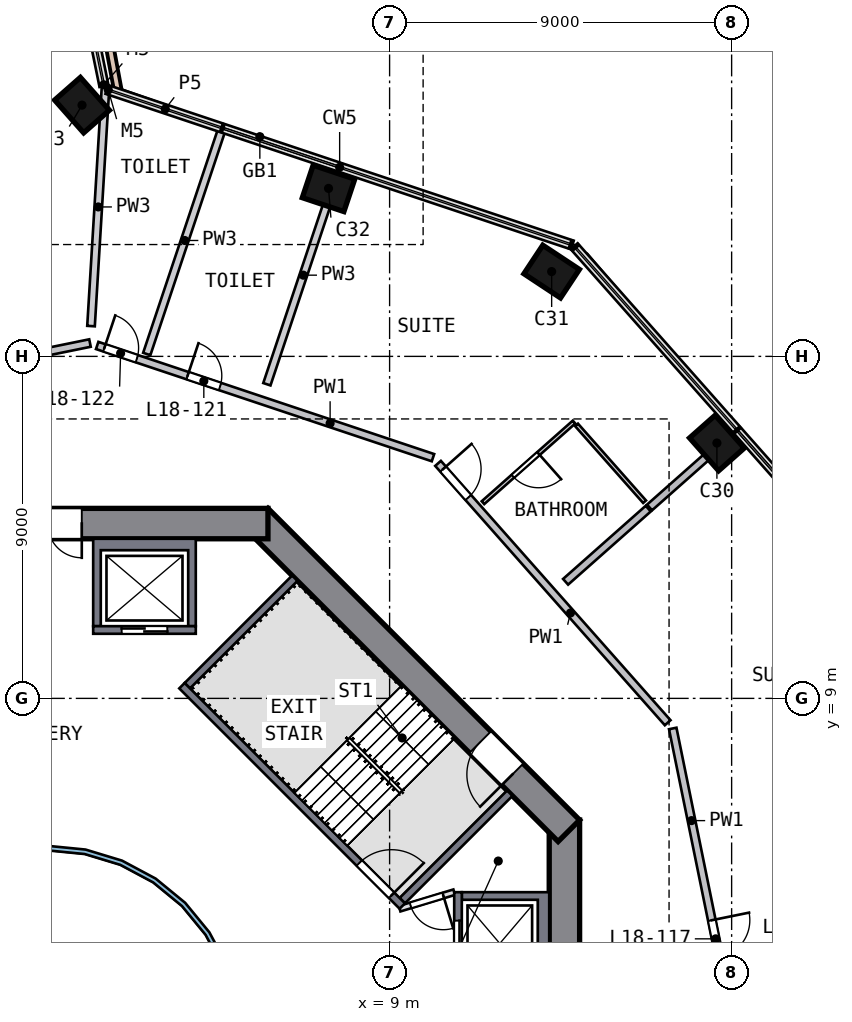
"""IFC4 building model, lengths in metres.
Left out: names, types, materials, properties, quantities, classifications, styles, units other than length and angle.
Written with IfcOpenShell. Run it as: python <this file> out.ifc"""

import sys

from ifc_helpers import new_model, si_unit, direction, frame, frame_2d, origin, origin_2d, place, context, subcontext, project, spatial, polyline, rectangle, outline, extrude, element, fill, save


model = new_model("IFC4")
c1 = context("Model", 3, precision=1e-05, world=origin(), true_north=direction((0.0, 1.0)))
c2 = subcontext(c1, "Body", "Model", "MODEL_VIEW")
j1 = project(units=[si_unit("LENGTHUNIT", "METRE"), si_unit("PLANEANGLEUNIT", "RADIAN")], contexts=[c1])
p1 = place(None, origin())
s1 = spatial("IfcSite", under=j1, at=p1, CompositionType="ELEMENT")
p2 = place(p1, origin())
s2 = spatial("IfcBuilding", under=s1, at=p2, CompositionType="ELEMENT")
p3 = place(p2, frame((0.0, 0.0, 81.0)))
s3 = spatial("IfcBuildingStorey", under=s2, at=p3, CompositionType="ELEMENT", Elevation=81.0)
p4 = place(p3, frame((17.676, 15.649, 0.0), z_axis=(-0.052724417, 0.058640346, 0.996885874), x_axis=(-0.660246291, 0.746898066, -0.078855026)))
e1 = element("IfcColumn", 1, at=p4, inside=s3, PredefinedType="COLUMN", context=c2, shape_type="SweptSolid", body=[
    extrude(rectangle(XDim=1.15, YDim=0.9, at=origin_2d()), origin(), (0.0, 0.0, 1.0), 4.705),
])
p5 = place(p3, frame((13.346, 20.179, 0.0), z_axis=(-0.067763164, 0.043999359, 0.996730761), x_axis=(0.831358719, -0.549832111, 0.080791885)))
e2 = element("IfcColumn", 2, at=p5, inside=s3, PredefinedType="COLUMN", context=c2, shape_type="SweptSolid", body=[
    extrude(rectangle(XDim=1.15, YDim=0.9, at=origin_2d()), origin(), (0.0, 0.0, 1.0), 4.705),
])
p6 = place(p3, frame((7.483, 22.391, 0.0), z_axis=(-0.074987109, 0.024338376, 0.996887444), x_axis=(-0.945566595, 0.31573538, -0.07883517)))
e3 = element("IfcColumn", 3, at=p6, inside=s3, PredefinedType="COLUMN", context=c2, shape_type="SweptSolid", body=[
    extrude(rectangle(XDim=1.15, YDim=0.9, at=origin_2d()), origin(), (0.0, 0.0, 1.0), 4.705),
])
p7 = place(p3, frame((1.006, 24.608, 0.0), z_axis=(-0.082177856, 0.002697758, 0.996614029), x_axis=(0.659030339, -0.750000815, 0.056371895)))
e4 = element("IfcColumn", 4, at=p7, inside=s3, PredefinedType="COLUMN", context=c2, shape_type="SweptSolid", body=[
    extrude(rectangle(XDim=1.15, YDim=0.9, at=origin_2d()), origin(), (0.0, 0.0, 1.0), 4.706),
])
p8 = place(p3, frame((13.6, -5.799, 0.0), z_axis=(0.0, 0.0, 1.0), x_axis=(0.0, 1.0, 0.0)))
e5 = element("IfcWall", 5, at=p8, inside=s3, PredefinedType="SHEAR", context=c2, shape_type="SweptSolid", body=[
    extrude(rectangle(XDim=11.598, YDim=0.8, at=frame_2d((5.799, 0.0))), origin(), (0.0, 0.0, 1.0), 5.0),
])
p9 = place(p8, frame((4.899, 0.0, 0.0)))
e6 = element("IfcOpeningElement", 6, at=p9, cuts=e5, PredefinedType="OPENING", context=c2, shape_type="SweptSolid", body=[
    extrude(rectangle(XDim=1.8, YDim=2.1, at=frame_2d((0.9, 1.05))), frame((0.0, 0.41, 0.0), z_axis=(0.0, -1.0, 0.0), x_axis=(1.0, 0.0, 0.0)), (0.0, 0.0, 1.0), 0.82),
])
p10 = place(p3, frame((13.717, 5.516, 0.0), z_axis=(0.0, 0.0, 1.0), x_axis=(-0.707106781, 0.707106781, 0.0)))
e7 = element("IfcWall", 7, at=p10, inside=s3, PredefinedType="SHEAR", context=c2, shape_type="SweptSolid", body=[
    extrude(rectangle(XDim=11.598, YDim=0.8, at=frame_2d((5.799, 0.0))), origin(), (0.0, 0.0, 1.0), 5.0),
])
p11 = place(p10, frame((2.099, 0.0, 0.0)))
e8 = element("IfcOpeningElement", 8, at=p11, cuts=e7, PredefinedType="OPENING", context=c2, shape_type="SweptSolid", body=[
    extrude(rectangle(XDim=1.2, YDim=2.1, at=frame_2d((0.6, 1.05))), frame((0.0, 0.41, 0.0), z_axis=(0.0, -1.0, 0.0), x_axis=(1.0, 0.0, 0.0)), (0.0, 0.0, 1.0), 0.82),
])
p12 = place(p3, frame((5.799, 13.6, 0.0), z_axis=(0.0, 0.0, 1.0), x_axis=(-1.0, 0.0, 0.0)))
e9 = element("IfcWall", 9, at=p12, inside=s3, PredefinedType="SHEAR", context=c2, shape_type="SweptSolid", body=[
    extrude(rectangle(XDim=11.598, YDim=0.8, at=frame_2d((5.799, 0.0))), origin(), (0.0, 0.0, 1.0), 5.0),
])
p13 = place(p12, frame((4.899, 0.0, 0.0)))
e10 = element("IfcOpeningElement", 10, at=p13, cuts=e9, PredefinedType="OPENING", context=c2, shape_type="SweptSolid", body=[
    extrude(rectangle(XDim=1.8, YDim=2.1, at=frame_2d((0.9, 1.05))), frame((0.0, 0.41, 0.0), z_axis=(0.0, -1.0, 0.0), x_axis=(1.0, 0.0, 0.0)), (0.0, 0.0, 1.0), 0.82),
])
p14 = place(p3, frame((1.855, 24.972, 0.0), z_axis=(0.0, 0.0, 1.0), x_axis=(-0.183261306, 0.983064237, 0.0)))
e11 = element("IfcWall", 11, at=p14, inside=s3, PredefinedType="PARAPET", context=c2, shape_type="SweptSolid", body=[
    extrude(rectangle(XDim=9.845, YDim=0.2, at=frame_2d((4.922, 0.0))), origin(), (0.0, 0.0, 1.0), 1.1),
])
p15 = place(p3, origin())
e12 = element("IfcWall", 12, at=p15, inside=s3, PredefinedType="SOLIDWALL", context=c2, shape_type="SweptSolid", body=[
    extrude(outline(polyline([(13.2, 3.9), (13.2, 1.2), (10.9, 1.2), (10.9, 1.4), (12.9, 1.4), (12.9, 3.7), (10.9, 3.7), (10.9, 3.9), (13.2, 3.9)])), origin(), (0.0, 0.0, 1.0), 4.69),
])
p16 = place(p3, frame((10.8, 1.2, 0.0), z_axis=(0.0, 0.0, 1.0), x_axis=(0.0, 1.0, 0.0)))
e13 = element("IfcWall", 13, at=p16, inside=s3, PredefinedType="SOLIDWALL", context=c2, shape_type="SweptSolid", body=[
    extrude(rectangle(XDim=2.7, YDim=0.2, at=frame_2d((1.35, 0.0))), origin(), (0.0, 0.0, 1.0), 4.69),
])
p17 = place(p16, frame((0.75, 0.0, 0.0)))
e14 = element("IfcOpeningElement", 14, at=p17, cuts=e13, PredefinedType="OPENING", context=c2, shape_type="SweptSolid", body=[
    extrude(rectangle(XDim=1.2, YDim=2.1, at=frame_2d((0.6, 1.05))), frame((0.0, 0.11, 0.0), z_axis=(0.0, -1.0, 0.0), x_axis=(1.0, 0.0, 0.0)), (0.0, 0.0, 1.0), 0.22),
])
p18 = place(p3, origin())
e15 = element("IfcWall", 15, at=p18, inside=s3, PredefinedType="SOLIDWALL", context=c2, shape_type="SweptSolid", body=[
    extrude(outline(polyline([(3.9, 13.2), (3.9, 10.9), (3.7, 10.9), (3.7, 12.9), (1.4, 12.9), (1.4, 10.9), (1.2, 10.9), (1.2, 13.2), (3.9, 13.2)])), origin(), (0.0, 0.0, 1.0), 4.69),
])
p19 = place(p3, frame((1.2, 10.8, 0.0), z_axis=(0.0, 0.0, 1.0), x_axis=(1.0, 0.0, 0.0)))
e16 = element("IfcWall", 16, at=p19, inside=s3, PredefinedType="SOLIDWALL", context=c2, shape_type="SweptSolid", body=[
    extrude(rectangle(XDim=2.7, YDim=0.2, at=frame_2d((1.35, 0.0))), origin(), (0.0, 0.0, 1.0), 4.69),
])
p20 = place(p19, frame((0.75, 0.0, 0.0)))
e17 = element("IfcOpeningElement", 17, at=p20, cuts=e16, PredefinedType="OPENING", context=c2, shape_type="SweptSolid", body=[
    extrude(rectangle(XDim=1.2, YDim=2.1, at=frame_2d((0.6, 1.05))), frame((0.0, 0.11, 0.0), z_axis=(0.0, -1.0, 0.0), x_axis=(1.0, 0.0, 0.0)), (0.0, 0.0, 1.0), 0.22),
])
p21 = place(p3, frame((3.535, 9.334, 0.0), z_axis=(0.0, 0.0, 1.0), x_axis=(0.707106781, -0.707106781, 0.0)))
e18 = element("IfcWall", 18, at=p21, inside=s3, PredefinedType="SOLIDWALL", context=c2, shape_type="SweptSolid", body=[
    extrude(rectangle(XDim=8.2, YDim=0.2, at=frame_2d((4.1, 0.0))), origin(), (0.0, 0.0, 1.0), 4.69),
])
p22 = place(p21, frame((6.6, 0.0, 0.0)))
e19 = element("IfcOpeningElement", 19, at=p22, cuts=e18, PredefinedType="OPENING", context=c2, shape_type="SweptSolid", body=[
    extrude(rectangle(XDim=1.2, YDim=2.1, at=frame_2d((0.6, 1.05))), frame((0.0, 0.11, 0.0), z_axis=(0.0, -1.0, 0.0), x_axis=(1.0, 0.0, 0.0)), (0.0, 0.0, 1.0), 0.22),
])
for number, where, z_axis, x_axis in (
    (20, (9.334, 3.677, 0.0), (0.0, 0.0, 1.0), (0.707, 0.707, 0.0)),
    (21, (3.677, 9.334, 0.0), (0.0, 0.0, 1.0), (0.707, 0.707, 0.0)),
):
    element("IfcWall", number, at=place(p3, frame(where, z_axis=z_axis, x_axis=x_axis)), inside=s3, PredefinedType="SOLIDWALL", context=c2, shape_type="SweptSolid", body=[
        extrude(rectangle(XDim=4.0, YDim=0.2, at=frame_2d((2.0, 0.0))), origin(), (0.0, 0.0, 1.0), 4.69),
    ])
p23 = place(p3, frame((10.7, 3.9, 0.0), z_axis=(0.0, 0.0, 1.0), x_axis=(-0.957084567, -0.289808785, 0.0)))
e22 = element("IfcWall", 22, at=p23, inside=s3, PredefinedType="PARTITIONING", context=c2, shape_type="SweptSolid", body=[
    extrude(rectangle(XDim=1.501, YDim=0.15, at=frame_2d((0.75, 0.0))), origin(), (0.0, 0.0, 1.0), 4.69),
])
p24 = place(p23, frame((0.301, 0.0, 0.0)))
e23 = element("IfcOpeningElement", 23, at=p24, cuts=e22, PredefinedType="OPENING", context=c2, shape_type="SweptSolid", body=[
    extrude(rectangle(XDim=0.9, YDim=2.1, at=frame_2d((0.45, 1.05))), frame((0.0, 0.085, 0.0), z_axis=(0.0, -1.0, 0.0), x_axis=(1.0, 0.0, 0.0)), (0.0, 0.0, 1.0), 0.17),
])
p25 = place(p3, origin())
e24 = element("IfcWall", 24, at=p25, inside=s3, PredefinedType="SOLIDWALL", context=c2, shape_type="SweptSolid", body=[
    extrude(outline(polyline([(5.021, -0.999), (4.73, -1.959), (4.257, -2.844), (3.62, -3.62), (2.844, -4.257), (1.959, -4.73), (0.999, -5.021), (0.0, -5.12), (-0.999, -5.021), (-1.959, -4.73), (-2.844, -4.257), (-3.62, -3.62), (-4.257, -2.844), (-4.73, -1.959), (-5.021, -0.999), (-5.12, 0.0), (-5.021, 0.999), (-4.73, 1.959), (-4.257, 2.844), (-3.62, 3.62), (-2.844, 4.257), (-1.959, 4.73), (-0.999, 5.021), (0.0, 5.12), (0.999, 5.021), (1.959, 4.73), (2.844, 4.257), (3.62, 3.62), (4.257, 2.844), (4.73, 1.959), (5.021, 0.999), (5.12, 0.0), (5.021, -0.999)]), holes=[polyline([(4.904, 0.976), (4.619, 1.913), (4.157, 2.778), (3.535, 3.535), (2.778, 4.157), (1.913, 4.619), (0.976, 4.904), (0.0, 5.0), (-0.976, 4.904), (-1.913, 4.619), (-2.778, 4.157), (-3.535, 3.535), (-4.157, 2.778), (-4.619, 1.913), (-4.904, 0.976), (-5.0, 0.0), (-4.904, -0.976), (-4.619, -1.913), (-4.157, -2.778), (-3.535, -3.535), (-2.778, -4.157), (-1.913, -4.619), (-0.976, -4.904), (0.0, -5.0), (0.976, -4.904), (1.913, -4.619), (2.778, -4.157), (3.535, -3.535), (4.157, -2.778), (4.619, -1.913), (4.904, -0.976), (5.0, 0.0), (4.904, 0.976)])]), origin(), (0.0, 0.0, 1.0), 4.69),
])
p26 = place(p3, frame((1.116, 18.351, 0.0), z_axis=(0.0, 0.0, 1.0), x_axis=(-0.979854553, -0.19971243, 0.0)))
e25 = element("IfcWall", 25, at=p26, inside=s3, PredefinedType="SOLIDWALL", context=c2, shape_type="SweptSolid", body=[
    extrude(rectangle(XDim=3.458, YDim=0.2, at=frame_2d((1.729, 0.0))), origin(), (0.0, 0.0, 1.0), 4.69),
])
p27 = place(p3, frame((1.306, 18.288, 0.0), z_axis=(0.0, 0.0, 1.0), x_axis=(0.948428791, -0.316990264, 0.0)))
e26 = element("IfcWall", 26, at=p27, inside=s3, PredefinedType="SOLIDWALL", context=c2, shape_type="SweptSolid", body=[
    extrude(rectangle(XDim=9.316, YDim=0.2, at=frame_2d((4.658, 0.0))), origin(), (0.0, 0.0, 1.0), 4.69),
])
p28 = place(p27, frame((2.508, 0.0, 0.0)))
e27 = element("IfcOpeningElement", 27, at=p28, cuts=e26, PredefinedType="OPENING", context=c2, shape_type="SweptSolid", body=[
    extrude(rectangle(XDim=0.9, YDim=2.1, at=frame_2d((0.45, 1.05))), frame((0.0, 0.11, 0.0), z_axis=(0.0, -1.0, 0.0), x_axis=(1.0, 0.0, 0.0)), (0.0, 0.0, 1.0), 0.22),
])
p29 = place(p27, frame((0.2, 0.0, 0.0)))
e28 = element("IfcOpeningElement", 28, at=p29, cuts=e26, PredefinedType="OPENING", context=c2, shape_type="SweptSolid", body=[
    extrude(rectangle(XDim=0.9, YDim=2.1, at=frame_2d((0.45, 1.05))), frame((0.0, 0.11, 0.0), z_axis=(0.0, -1.0, 0.0), x_axis=(1.0, 0.0, 0.0)), (0.0, 0.0, 1.0), 0.22),
])
p30 = place(p3, frame((10.275, 15.184, 0.0), z_axis=(0.0, 0.0, 1.0), x_axis=(0.662882999, -0.748722999, 0.0)))
e29 = element("IfcWall", 29, at=p30, inside=s3, PredefinedType="SOLIDWALL", context=c2, shape_type="SweptSolid", body=[
    extrude(rectangle(XDim=9.115, YDim=0.2, at=frame_2d((4.558, 0.0))), origin(), (0.0, 0.0, 1.0), 4.69),
])
p31 = place(p30, frame((0.2, 0.0, 0.0)))
e30 = element("IfcOpeningElement", 30, at=p31, cuts=e29, PredefinedType="OPENING", context=c2, shape_type="SweptSolid", body=[
    extrude(rectangle(XDim=1.0, YDim=2.1, at=frame_2d((0.5, 1.05))), frame((0.0, 0.11, 0.0), z_axis=(0.0, -1.0, 0.0), x_axis=(1.0, 0.0, 0.0)), (0.0, 0.0, 1.0), 0.22),
])
p32 = place(p3, frame((16.45, 8.208, 0.0), z_axis=(0.0, 0.0, 1.0), x_axis=(0.199693015, -0.97985851, 0.0)))
e31 = element("IfcWall", 31, at=p32, inside=s3, PredefinedType="SOLIDWALL", context=c2, shape_type="SweptSolid", body=[
    extrude(rectangle(XDim=9.316, YDim=0.2, at=frame_2d((4.658, 0.0))), origin(), (0.0, 0.0, 1.0), 4.69),
])
p33 = place(p32, frame((5.15, 0.0, 0.0)))
e32 = element("IfcOpeningElement", 32, at=p33, cuts=e31, PredefinedType="OPENING", context=c2, shape_type="SweptSolid", body=[
    extrude(rectangle(XDim=1.0, YDim=2.1, at=frame_2d((0.5, 1.05))), frame((0.0, 0.11, 0.0), z_axis=(0.0, -1.0, 0.0), x_axis=(1.0, 0.0, 0.0)), (0.0, 0.0, 1.0), 0.22),
])
p34 = place(p3, frame((13.631, 12.068, 0.0), z_axis=(0.0, 0.0, 1.0), x_axis=(0.748710935, 0.662896626, 0.0)))
e33 = element("IfcWall", 33, at=p34, inside=s3, PredefinedType="SOLIDWALL", context=c2, shape_type="SweptSolid", body=[
    extrude(rectangle(XDim=2.905, YDim=0.2, at=frame_2d((1.452, 0.0))), origin(), (0.0, 0.0, 1.0), 4.69),
])
p35 = place(p3, frame((15.84, 14.024, 0.0), z_axis=(0.0, 0.0, 1.0), x_axis=(0.74873661, 0.662867626, 0.0)))
e34 = element("IfcWall", 34, at=p35, inside=s3, PredefinedType="SOLIDWALL", context=c2, shape_type="SweptSolid", body=[
    extrude(rectangle(XDim=3.102, YDim=0.2, at=frame_2d((1.551, 0.0))), origin(), (0.0, 0.0, 1.0), 4.69),
])
p36 = place(p3, frame((13.853, 16.271, 0.0), z_axis=(0.0, 0.0, 1.0), x_axis=(-0.748721252, -0.662884973, 0.0)))
e35 = element("IfcWall", 35, at=p36, inside=s3, PredefinedType="PARTITIONING", context=c2, shape_type="SweptSolid", body=[
    extrude(rectangle(XDim=3.2, YDim=0.1, at=frame_2d((1.6, 0.0))), origin(), (0.0, 0.0, 1.0), 4.69),
])
p37 = place(p36, frame((1.25, 0.0, 0.0)))
e36 = element("IfcOpeningElement", 36, at=p37, cuts=e35, PredefinedType="OPENING", context=c2, shape_type="SweptSolid", body=[
    extrude(rectangle(XDim=0.9, YDim=2.1, at=frame_2d((0.45, 1.05))), frame((0.0, 0.06, 0.0), z_axis=(0.0, -1.0, 0.0), x_axis=(1.0, 0.0, 0.0)), (0.0, 0.0, 1.0), 0.12),
])
p38 = place(p3, frame((13.919, 16.197, 0.0), z_axis=(0.0, 0.0, 1.0), x_axis=(0.662897695, -0.748709987, 0.0)))
e37 = element("IfcWall", 37, at=p38, inside=s3, PredefinedType="PARTITIONING", context=c2, shape_type="SweptSolid", body=[
    extrude(rectangle(XDim=2.7, YDim=0.1, at=frame_2d((1.35, 0.0))), origin(), (0.0, 0.0, 1.0), 4.69),
])
p39 = place(p3, frame((1.524, 25.068, 0.0), z_axis=(0.0, 0.0, 1.0), x_axis=(-0.060706271, -0.998155674, 0.0)))
e38 = element("IfcWall", 38, at=p39, inside=s3, PredefinedType="SOLIDWALL", context=c2, shape_type="SweptSolid", body=[
    extrude(rectangle(XDim=6.282, YDim=0.2, at=frame_2d((3.141, 0.0))), origin(), (0.0, 0.0, 1.0), 4.69),
])
p40 = place(p3, frame((2.61, 18.062, 0.0), z_axis=(0.0, 0.0, 1.0), x_axis=(0.316960102, 0.948438872, 0.0)))
e39 = element("IfcWall", 39, at=p40, inside=s3, PredefinedType="SOLIDWALL", context=c2, shape_type="SweptSolid", body=[
    extrude(rectangle(XDim=6.3, YDim=0.2, at=frame_2d((3.15, 0.0))), origin(), (0.0, 0.0, 1.0), 4.69),
])
p41 = place(p3, frame((7.689, 23.007, 0.0), z_axis=(0.0, 0.0, 1.0), x_axis=(-0.316965832, -0.948436957, 0.0)))
e40 = element("IfcWall", 40, at=p41, inside=s3, PredefinedType="SOLIDWALL", context=c2, shape_type="SweptSolid", body=[
    extrude(rectangle(XDim=6.052, YDim=0.2, at=frame_2d((3.026, 0.0))), origin(), (0.0, 0.0, 1.0), 4.69),
])
p42 = place(p17, origin())
e41 = element("IfcDoor", 41, at=p42, inside=s3, OperationType="DOUBLE_DOOR_SLIDING", PredefinedType="DOOR", context=c2, shape_type="SweptSolid", body=[
    extrude(rectangle(XDim=1.2, YDim=2.1, at=frame_2d((0.6, 1.05))), frame((0.0, 0.025, 0.0), z_axis=(0.0, -1.0, 0.0), x_axis=(1.0, 0.0, 0.0)), (0.0, 0.0, 1.0), 0.05),
])
fill(e14, e41)
p43 = place(p20, origin())
e42 = element("IfcDoor", 42, at=p43, inside=s3, OperationType="DOUBLE_DOOR_SLIDING", PredefinedType="DOOR", context=c2, shape_type="SweptSolid", body=[
    extrude(rectangle(XDim=1.2, YDim=2.1, at=frame_2d((0.6, 1.05))), frame((0.0, 0.025, 0.0), z_axis=(0.0, -1.0, 0.0), x_axis=(1.0, 0.0, 0.0)), (0.0, 0.0, 1.0), 0.05),
])
fill(e17, e42)
p44 = place(p22, origin())
e43 = element("IfcDoor", 43, at=p44, inside=s3, OperationType="SINGLE_SWING_RIGHT", PredefinedType="DOOR", context=c2, shape_type="SweptSolid", body=[
    extrude(rectangle(XDim=1.2, YDim=2.1, at=frame_2d((0.6, 1.05))), frame((0.0, 0.025, 0.0), z_axis=(0.0, -1.0, 0.0), x_axis=(1.0, 0.0, 0.0)), (0.0, 0.0, 1.0), 0.05),
])
fill(e19, e43)
p45 = place(p13, origin())
e44 = element("IfcDoor", 44, at=p45, inside=s3, OperationType="DOUBLE_DOOR_SINGLE_SWING", PredefinedType="DOOR", context=c2, shape_type="SweptSolid", body=[
    extrude(rectangle(XDim=1.8, YDim=2.1, at=frame_2d((0.9, 1.05))), frame((0.0, 0.025, 0.0), z_axis=(0.0, -1.0, 0.0), x_axis=(1.0, 0.0, 0.0)), (0.0, 0.0, 1.0), 0.05),
])
fill(e10, e44)
p46 = place(p11, origin())
e45 = element("IfcDoor", 45, at=p46, inside=s3, OperationType="SINGLE_SWING_LEFT", PredefinedType="DOOR", context=c2, shape_type="SweptSolid", body=[
    extrude(rectangle(XDim=1.2, YDim=2.1, at=frame_2d((0.6, 1.05))), frame((0.0, 0.025, 0.0), z_axis=(0.0, -1.0, 0.0), x_axis=(1.0, 0.0, 0.0)), (0.0, 0.0, 1.0), 0.05),
])
fill(e8, e45)
p47 = place(p24, origin())
e46 = element("IfcDoor", 46, at=p47, inside=s3, OperationType="SINGLE_SWING_LEFT", PredefinedType="DOOR", context=c2, shape_type="SweptSolid", body=[
    extrude(rectangle(XDim=0.9, YDim=2.1, at=frame_2d((0.45, 1.05))), frame((0.0, 0.025, 0.0), z_axis=(0.0, -1.0, 0.0), x_axis=(1.0, 0.0, 0.0)), (0.0, 0.0, 1.0), 0.05),
])
fill(e23, e46)
p48 = place(p33, origin())
e47 = element("IfcDoor", 47, at=p48, inside=s3, OperationType="SINGLE_SWING_LEFT", PredefinedType="DOOR", context=c2, shape_type="SweptSolid", body=[
    extrude(rectangle(XDim=1.0, YDim=2.1, at=frame_2d((0.5, 1.05))), frame((0.0, 0.025, 0.0), z_axis=(0.0, -1.0, 0.0), x_axis=(1.0, 0.0, 0.0)), (0.0, 0.0, 1.0), 0.05),
])
fill(e32, e47)
p49 = place(p31, origin())
e48 = element("IfcDoor", 48, at=p49, inside=s3, OperationType="SINGLE_SWING_LEFT", PredefinedType="DOOR", context=c2, shape_type="SweptSolid", body=[
    extrude(rectangle(XDim=1.0, YDim=2.1, at=frame_2d((0.5, 1.05))), frame((0.0, 0.025, 0.0), z_axis=(0.0, -1.0, 0.0), x_axis=(1.0, 0.0, 0.0)), (0.0, 0.0, 1.0), 0.05),
])
fill(e30, e48)
p50 = place(p37, origin())
e49 = element("IfcDoor", 49, at=p50, inside=s3, OperationType="SINGLE_SWING_LEFT", PredefinedType="DOOR", context=c2, shape_type="SweptSolid", body=[
    extrude(rectangle(XDim=0.9, YDim=2.1, at=frame_2d((0.45, 1.05))), frame((0.0, 0.025, 0.0), z_axis=(0.0, -1.0, 0.0), x_axis=(1.0, 0.0, 0.0)), (0.0, 0.0, 1.0), 0.05),
])
fill(e36, e49)
p51 = place(p28, origin())
e50 = element("IfcDoor", 50, at=p51, inside=s3, OperationType="SINGLE_SWING_LEFT", PredefinedType="DOOR", context=c2, shape_type="SweptSolid", body=[
    extrude(rectangle(XDim=0.9, YDim=2.1, at=frame_2d((0.45, 1.05))), frame((0.0, 0.025, 0.0), z_axis=(0.0, -1.0, 0.0), x_axis=(1.0, 0.0, 0.0)), (0.0, 0.0, 1.0), 0.05),
])
fill(e27, e50)
p52 = place(p29, origin())
e51 = element("IfcDoor", 51, at=p52, inside=s3, OperationType="SINGLE_SWING_LEFT", PredefinedType="DOOR", context=c2, shape_type="SweptSolid", body=[
    extrude(rectangle(XDim=0.9, YDim=2.1, at=frame_2d((0.45, 1.05))), frame((0.0, 0.025, 0.0), z_axis=(0.0, -1.0, 0.0), x_axis=(1.0, 0.0, 0.0)), (0.0, 0.0, 1.0), 0.05),
])
fill(e28, e51)
save(model, sys.argv[1])
